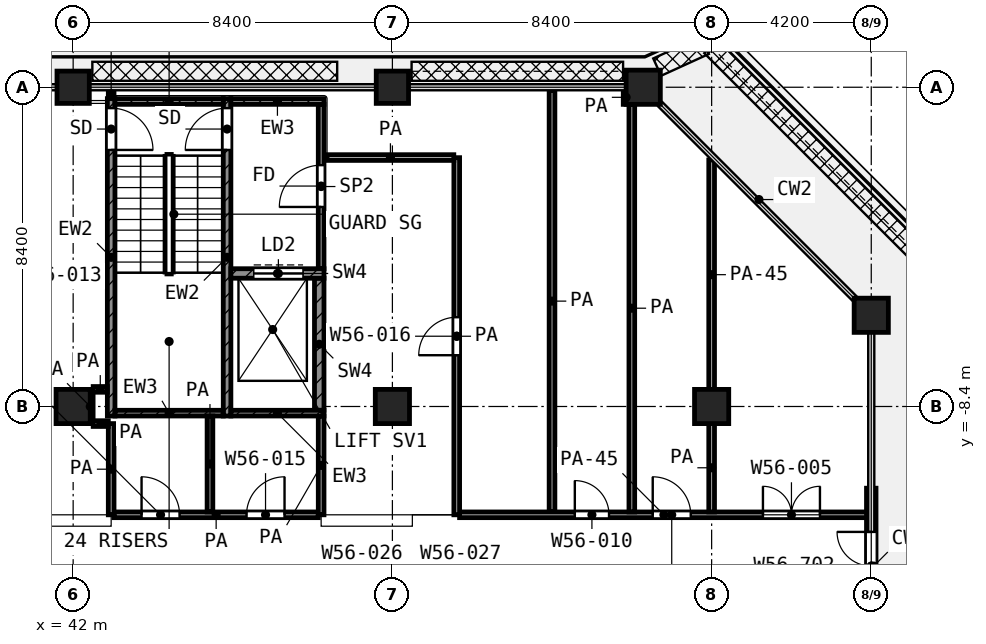
"""IFC4 building model, lengths in metres.
Left out: names, types, materials, properties, quantities, classifications, styles, units other than length and angle.
Written with IfcOpenShell. Run it as: python <this file> out.ifc"""

import sys

from ifc_helpers import new_model, si_unit, direction, frame, frame_2d, origin, origin_2d, place, context, subcontext, project, spatial, rectangle, extrude, element, fill, save


model = new_model("IFC4")
c1 = context("Model", 3, precision=1e-05, world=origin(), true_north=direction((0.0, 1.0)))
c2 = subcontext(c1, "Body", "Model", "MODEL_VIEW")
j1 = project(units=[si_unit("LENGTHUNIT", "METRE"), si_unit("PLANEANGLEUNIT", "RADIAN")], contexts=[c1])
p1 = place(None, origin())
s1 = spatial("IfcSite", under=j1, at=p1, CompositionType="ELEMENT")
p2 = place(p1, origin())
s2 = spatial("IfcBuilding", under=s1, at=p2, CompositionType="ELEMENT")
p3 = place(p2, frame((0.0, 0.0, 243.2)))
s3 = spatial("IfcBuildingStorey", under=s2, at=p3, CompositionType="ELEMENT", Elevation=243.2)
for number, where, z_axis, x_axis in (
    (1, (42.0, 0.0, 0.0), (0.0, 0.0, 1.0), (1.0, 0.0, 0.0)),
    (2, (50.4, 0.0, 0.0), (0.0, 0.0, 1.0), (1.0, 0.0, 0.0)),
):
    element("IfcColumn", number, at=place(p3, frame(where, z_axis=z_axis, x_axis=x_axis)), inside=s3, PredefinedType="COLUMN", context=c2, shape_type="SweptSolid", body=[
        extrude(rectangle(XDim=0.85, YDim=0.85, at=origin_2d()), origin(), (0.0, 0.0, 1.0), 4.2),
    ])
for number, where, z_axis, x_axis in (
    (3, (57.0, 0.0, 0.0), (0.0, 0.0, 1.0), (1.0, 0.0, 0.0)),
    (4, (63.0, -6.0, 0.0), (0.0, 0.0, 1.0), (1.0, 0.0, 0.0)),
    (5, (42.0, -8.4, 0.0), (0.0, 0.0, 1.0), (1.0, 0.0, 0.0)),
    (6, (50.4, -8.4, 0.0), (0.0, 0.0, 1.0), (1.0, 0.0, 0.0)),
    (7, (58.8, -8.4, 0.0), (0.0, 0.0, 1.0), (1.0, 0.0, 0.0)),
):
    element("IfcColumn", number, at=place(p3, frame(where, z_axis=z_axis, x_axis=x_axis)), inside=s3, PredefinedType="COLUMN", context=c2, shape_type="SweptSolid", body=[
        extrude(rectangle(XDim=0.9, YDim=0.9, at=origin_2d()), origin(), (0.0, 0.0, 1.0), 4.2),
    ])
p4 = place(p3, frame((63.0, -14.65, 0.0), z_axis=(0.0, 0.0, 1.0), x_axis=(0.0, 1.0, 0.0)))
e8 = element("IfcWall", 8, at=p4, inside=s3, PredefinedType="SOLIDWALL", context=c2, shape_type="SweptSolid", body=[
    extrude(rectangle(XDim=4.1, YDim=0.25, at=frame_2d((2.05, 0.0))), origin(), (0.0, 0.0, 1.0), 2.58),
])
p5 = place(p4, frame((1.15, 0.0, 0.0)))
e9 = element("IfcOpeningElement", 9, at=p5, cuts=e8, PredefinedType="OPENING", context=c2, shape_type="SweptSolid", body=[
    extrude(rectangle(XDim=1.8, YDim=2.1, at=frame_2d((0.9, 1.05))), frame((0.0, 0.135, 0.0), z_axis=(0.0, -1.0, 0.0), x_axis=(1.0, 0.0, 0.0)), (0.0, 0.0, 1.0), 0.27),
])
p6 = place(p3, frame((43.0, -8.65, 0.0), z_axis=(0.0, 0.0, 1.0), x_axis=(0.0, 1.0, 0.0)))
e10 = element("IfcWall", 10, at=p6, inside=s3, PredefinedType="SHEAR", context=c2, shape_type="SweptSolid", body=[
    extrude(rectangle(XDim=8.35, YDim=0.2, at=frame_2d((4.175, 0.0))), origin(), (0.0, 0.0, 1.0), 3.6),
])
p7 = place(p6, frame((7.0, 0.0, 0.0)))
e11 = element("IfcOpeningElement", 11, at=p7, cuts=e10, PredefinedType="OPENING", context=c2, shape_type="SweptSolid", body=[
    extrude(rectangle(XDim=1.1, YDim=2.1, at=frame_2d((0.55, 1.05))), frame((0.0, 0.11, 0.0), z_axis=(0.0, -1.0, 0.0), x_axis=(1.0, 0.0, 0.0)), (0.0, 0.0, 1.0), 0.22),
])
p8 = place(p3, frame((46.05, -8.65, 0.0), z_axis=(0.0, 0.0, 1.0), x_axis=(0.0, 1.0, 0.0)))
e12 = element("IfcWall", 12, at=p8, inside=s3, PredefinedType="SHEAR", context=c2, shape_type="SweptSolid", body=[
    extrude(rectangle(XDim=8.35, YDim=0.2, at=frame_2d((4.175, 0.0))), origin(), (0.0, 0.0, 1.0), 3.6),
])
p9 = place(p8, frame((7.0, 0.0, 0.0)))
e13 = element("IfcOpeningElement", 13, at=p9, cuts=e12, PredefinedType="OPENING", context=c2, shape_type="SweptSolid", body=[
    extrude(rectangle(XDim=1.1, YDim=2.1, at=frame_2d((0.55, 1.05))), frame((0.0, 0.11, 0.0), z_axis=(0.0, -1.0, 0.0), x_axis=(1.0, 0.0, 0.0)), (0.0, 0.0, 1.0), 0.22),
])
p10 = place(p3, frame((43.1, -0.375, 0.0), z_axis=(0.0, 0.0, 1.0), x_axis=(1.0, 0.0, 0.0)))
e14 = element("IfcWall", 14, at=p10, inside=s3, PredefinedType="SHEAR", context=c2, shape_type="SweptSolid", body=[
    extrude(rectangle(XDim=2.85, YDim=0.15, at=frame_2d((1.425, 0.0))), origin(), (0.0, 0.0, 1.0), 3.6),
])
p11 = place(p3, frame((46.15, -0.375, 0.0), z_axis=(0.0, 0.0, 1.0), x_axis=(1.0, 0.0, 0.0)))
e15 = element("IfcWall", 15, at=p11, inside=s3, PredefinedType="SHEAR", context=c2, shape_type="SweptSolid", body=[
    extrude(rectangle(XDim=2.45, YDim=0.15, at=frame_2d((1.225, 0.0))), origin(), (0.0, 0.0, 1.0), 3.6),
])
p12 = place(p3, frame((43.1, -8.575, 0.0), z_axis=(0.0, 0.0, 1.0), x_axis=(1.0, 0.0, 0.0)))
e16 = element("IfcWall", 16, at=p12, inside=s3, PredefinedType="SHEAR", context=c2, shape_type="SweptSolid", body=[
    extrude(rectangle(XDim=2.85, YDim=0.15, at=frame_2d((1.425, 0.0))), origin(), (0.0, 0.0, 1.0), 3.6),
])
p13 = place(p3, frame((46.15, -8.575, 0.0), z_axis=(0.0, 0.0, 1.0), x_axis=(1.0, 0.0, 0.0)))
e17 = element("IfcWall", 17, at=p13, inside=s3, PredefinedType="SHEAR", context=c2, shape_type="SweptSolid", body=[
    extrude(rectangle(XDim=2.45, YDim=0.15, at=frame_2d((1.225, 0.0))), origin(), (0.0, 0.0, 1.0), 3.6),
])
p14 = place(p3, frame((46.15, -4.9, 0.0), z_axis=(0.0, 0.0, 1.0), x_axis=(1.0, 0.0, 0.0)))
e18 = element("IfcWall", 18, at=p14, inside=s3, PredefinedType="SHEAR", context=c2, shape_type="SweptSolid", body=[
    extrude(rectangle(XDim=2.45, YDim=0.25, at=frame_2d((1.225, 0.0))), origin(), (0.0, 0.0, 1.0), 3.6),
])
p15 = place(p14, frame((0.6, 0.0, 0.0)))
e19 = element("IfcOpeningElement", 19, at=p15, cuts=e18, PredefinedType="OPENING", context=c2, shape_type="SweptSolid", body=[
    extrude(rectangle(XDim=1.3, YDim=2.1, at=frame_2d((0.65, 1.05))), frame((0.0, 0.135, 0.0), z_axis=(0.0, -1.0, 0.0), x_axis=(1.0, 0.0, 0.0)), (0.0, 0.0, 1.0), 0.27),
])
p16 = place(p3, frame((48.475, -8.5, 0.0), z_axis=(0.0, 0.0, 1.0), x_axis=(0.0, 1.0, 0.0)))
e20 = element("IfcWall", 20, at=p16, inside=s3, PredefinedType="SHEAR", context=c2, shape_type="SweptSolid", body=[
    extrude(rectangle(XDim=3.475, YDim=0.25, at=frame_2d((1.738, 0.0))), origin(), (0.0, 0.0, 1.0), 3.6),
])
p17 = place(p3, frame((48.525, -4.775, 0.0), z_axis=(0.0, 0.0, 1.0), x_axis=(0.0, 1.0, 0.0)))
e21 = element("IfcWall", 21, at=p17, inside=s3, PredefinedType="PARTITIONING", context=c2, shape_type="SweptSolid", body=[
    extrude(rectangle(XDim=4.325, YDim=0.15, at=frame_2d((2.163, 0.0))), origin(), (0.0, 0.0, 1.0), 3.6),
])
p18 = place(p17, frame((1.625, 0.0, 0.0)))
e22 = element("IfcOpeningElement", 22, at=p18, cuts=e21, PredefinedType="OPENING", context=c2, shape_type="SweptSolid", body=[
    extrude(rectangle(XDim=1.1, YDim=2.1, at=frame_2d((0.55, 1.05))), frame((0.0, 0.085, 0.0), z_axis=(0.0, -1.0, 0.0), x_axis=(1.0, 0.0, 0.0)), (0.0, 0.0, 1.0), 0.17),
])
p19 = place(p3, frame((43.075, -11.25, 0.0), z_axis=(0.0, 0.0, 1.0), x_axis=(1.0, 0.0, 0.0)))
e23 = element("IfcWall", 23, at=p19, inside=s3, PredefinedType="PARTITIONING", context=c2, shape_type="SweptSolid", body=[
    extrude(rectangle(XDim=5.375, YDim=0.15, at=frame_2d((2.688, 0.0))), origin(), (0.0, 0.0, 1.0), 3.6),
])
p20 = place(p19, frame((0.725, 0.0, 0.0)))
e24 = element("IfcOpeningElement", 24, at=p20, cuts=e23, PredefinedType="OPENING", context=c2, shape_type="SweptSolid", body=[
    extrude(rectangle(XDim=1.0, YDim=2.1, at=frame_2d((0.5, 1.05))), frame((0.0, 0.085, 0.0), z_axis=(0.0, -1.0, 0.0), x_axis=(1.0, 0.0, 0.0)), (0.0, 0.0, 1.0), 0.17),
])
p21 = place(p19, frame((3.487, 0.0, 0.0)))
e25 = element("IfcOpeningElement", 25, at=p21, cuts=e23, PredefinedType="OPENING", context=c2, shape_type="SweptSolid", body=[
    extrude(rectangle(XDim=1.0, YDim=2.1, at=frame_2d((0.5, 1.05))), frame((0.0, 0.085, 0.0), z_axis=(0.0, -1.0, 0.0), x_axis=(1.0, 0.0, 0.0)), (0.0, 0.0, 1.0), 0.17),
])
p22 = place(p3, frame((52.168, -11.25, 0.0), z_axis=(0.0, 0.0, 1.0), x_axis=(1.0, 0.0, 0.0)))
e26 = element("IfcWall", 26, at=p22, inside=s3, PredefinedType="PARTITIONING", context=c2, shape_type="SweptSolid", body=[
    extrude(rectangle(XDim=10.752, YDim=0.15, at=frame_2d((5.376, 0.0))), origin(), (0.0, 0.0, 1.0), 2.7),
])
p23 = place(p22, frame((3.032, 0.0, 0.0)))
e27 = element("IfcOpeningElement", 27, at=p23, cuts=e26, PredefinedType="OPENING", context=c2, shape_type="SweptSolid", body=[
    extrude(rectangle(XDim=0.9, YDim=2.1, at=frame_2d((0.45, 1.05))), frame((0.0, 0.085, 0.0), z_axis=(0.0, -1.0, 0.0), x_axis=(1.0, 0.0, 0.0)), (0.0, 0.0, 1.0), 0.17),
])
p24 = place(p22, frame((5.082, 0.0, 0.0)))
e28 = element("IfcOpeningElement", 28, at=p24, cuts=e26, PredefinedType="OPENING", context=c2, shape_type="SweptSolid", body=[
    extrude(rectangle(XDim=1.0, YDim=2.1, at=frame_2d((0.5, 1.05))), frame((0.0, 0.085, 0.0), z_axis=(0.0, -1.0, 0.0), x_axis=(1.0, 0.0, 0.0)), (0.0, 0.0, 1.0), 0.17),
])
p25 = place(p22, frame((7.982, 0.0, 0.0)))
e29 = element("IfcOpeningElement", 29, at=p25, cuts=e26, PredefinedType="OPENING", context=c2, shape_type="SweptSolid", body=[
    extrude(rectangle(XDim=1.5, YDim=2.1, at=frame_2d((0.75, 1.05))), frame((0.0, 0.085, 0.0), z_axis=(0.0, -1.0, 0.0), x_axis=(1.0, 0.0, 0.0)), (0.0, 0.0, 1.0), 0.17),
])
p26 = place(p3, frame((42.527, -8.85, 0.0), z_axis=(0.0, 0.0, 1.0), x_axis=(1.0, 0.0, 0.0)))
e30 = element("IfcWall", 30, at=p26, inside=s3, PredefinedType="PARTITIONING", context=c2, shape_type="SweptSolid", body=[
    extrude(rectangle(XDim=0.398, YDim=0.15, at=frame_2d((0.199, 0.0))), origin(), (0.0, 0.0, 1.0), 3.6),
])
p27 = place(p3, frame((42.527, -7.95, 0.0), z_axis=(0.0, 0.0, 1.0), x_axis=(1.0, 0.0, 0.0)))
e31 = element("IfcWall", 31, at=p27, inside=s3, PredefinedType="PARTITIONING", context=c2, shape_type="SweptSolid", body=[
    extrude(rectangle(XDim=0.373, YDim=0.15, at=frame_2d((0.187, 0.0))), origin(), (0.0, 0.0, 1.0), 3.6),
])
p28 = place(p3, frame((48.68, -1.85, 0.0), z_axis=(0.0, 0.0, 1.0), x_axis=(1.0, 0.0, 0.0)))
e32 = element("IfcWall", 32, at=p28, inside=s3, PredefinedType="PARTITIONING", context=c2, shape_type="SweptSolid", body=[
    extrude(rectangle(XDim=3.336, YDim=0.15, at=frame_2d((1.668, 0.0))), origin(), (0.0, 0.0, 1.0), 3.6),
])
p29 = place(p3, frame((42.45, -8.849, 0.0), z_axis=(0.0, 0.0, 1.0), x_axis=(0.0, 1.0, 0.0)))
e33 = element("IfcWall", 33, at=p29, inside=s3, PredefinedType="PARTITIONING", context=c2, shape_type="SweptSolid", body=[
    extrude(rectangle(XDim=0.897, YDim=0.15, at=frame_2d((0.449, 0.0))), origin(), (0.0, 0.0, 1.0), 3.6),
])
p30 = place(p3, frame((43.0, -11.25, 0.0), z_axis=(0.0, 0.0, 1.0), x_axis=(0.0, 1.0, 0.0)))
e34 = element("IfcWall", 34, at=p30, inside=s3, PredefinedType="PARTITIONING", context=c2, shape_type="SweptSolid", body=[
    extrude(rectangle(XDim=2.4, YDim=0.15, at=frame_2d((1.2, 0.0))), origin(), (0.0, 0.0, 1.0), 3.6),
])
p31 = place(p3, frame((43.0, -0.27, 0.0), z_axis=(0.0, 0.0, 1.0), x_axis=(0.0, 1.0, 0.0)))
e35 = element("IfcWall", 35, at=p31, inside=s3, PredefinedType="PARTITIONING", context=c2, shape_type="SweptSolid", body=[
    extrude(rectangle(XDim=0.19, YDim=0.15, at=frame_2d((0.095, 0.0))), origin(), (0.0, 0.0, 1.0), 3.6),
])
p32 = place(p3, frame((45.6, -11.175, 0.0), z_axis=(0.0, 0.0, 1.0), x_axis=(0.0, 1.0, 0.0)))
e36 = element("IfcWall", 36, at=p32, inside=s3, PredefinedType="PARTITIONING", context=c2, shape_type="SweptSolid", body=[
    extrude(rectangle(XDim=2.525, YDim=0.15, at=frame_2d((1.263, 0.0))), origin(), (0.0, 0.0, 1.0), 3.6),
])
p33 = place(p3, frame((48.525, -11.25, 0.0), z_axis=(0.0, 0.0, 1.0), x_axis=(0.0, 1.0, 0.0)))
e37 = element("IfcWall", 37, at=p33, inside=s3, PredefinedType="PARTITIONING", context=c2, shape_type="SweptSolid", body=[
    extrude(rectangle(XDim=2.6, YDim=0.15, at=frame_2d((1.3, 0.0))), origin(), (0.0, 0.0, 1.0), 3.6),
])
p34 = place(p3, frame((52.093, -11.25, 0.0), z_axis=(0.0, 0.0, 1.0), x_axis=(0.0, 1.0, 0.0)))
e38 = element("IfcWall", 38, at=p34, inside=s3, PredefinedType="PARTITIONING", context=c2, shape_type="SweptSolid", body=[
    extrude(rectangle(XDim=9.397, YDim=0.15, at=frame_2d((4.698, 0.0))), origin(), (0.0, 0.0, 1.0), 3.6),
])
p35 = place(p34, frame((4.199, 0.0, 0.0)))
e39 = element("IfcOpeningElement", 39, at=p35, cuts=e38, PredefinedType="OPENING", context=c2, shape_type="SweptSolid", body=[
    extrude(rectangle(XDim=1.0, YDim=2.1, at=frame_2d((0.5, 1.05))), frame((0.0, 0.085, 0.0), z_axis=(0.0, -1.0, 0.0), x_axis=(1.0, 0.0, 0.0)), (0.0, 0.0, 1.0), 0.17),
])
p36 = place(p3, frame((54.6, -11.175, 0.0), z_axis=(0.0, 0.0, 1.0), x_axis=(0.0, 1.0, 0.0)))
e40 = element("IfcWall", 40, at=p36, inside=s3, PredefinedType="PARTITIONING", context=c2, shape_type="SweptSolid", body=[
    extrude(rectangle(XDim=11.095, YDim=0.15, at=frame_2d((5.547, 0.0))), origin(), (0.0, 0.0, 1.0), 3.6),
])
p37 = place(p3, frame((56.55, -0.45, 0.0), z_axis=(0.0, 0.0, 1.0), x_axis=(0.0, 1.0, 0.0)))
e41 = element("IfcWall", 41, at=p37, inside=s3, PredefinedType="PARTITIONING", context=c2, shape_type="SweptSolid", body=[
    extrude(rectangle(XDim=0.37, YDim=0.15, at=frame_2d((0.185, 0.0))), origin(), (0.0, 0.0, 1.0), 3.6),
])
p38 = place(p3, frame((56.7, -11.175, 0.0), z_axis=(0.0, 0.0, 1.0), x_axis=(0.0, 1.0, 0.0)))
e42 = element("IfcWall", 42, at=p38, inside=s3, PredefinedType="PARTITIONING", context=c2, shape_type="SweptSolid", body=[
    extrude(rectangle(XDim=10.722, YDim=0.15, at=frame_2d((5.361, 0.0))), origin(), (0.0, 0.0, 1.0), 3.6),
])
p39 = place(p3, frame((58.8, -11.175, 0.0), z_axis=(0.0, 0.0, 1.0), x_axis=(0.0, 1.0, 0.0)))
e43 = element("IfcWall", 43, at=p39, inside=s3, PredefinedType="PARTITIONING", context=c2, shape_type="SweptSolid", body=[
    extrude(rectangle(XDim=2.325, YDim=0.15, at=frame_2d((1.163, 0.0))), origin(), (0.0, 0.0, 1.0), 3.6),
])
p40 = place(p3, frame((58.8, -7.95, 0.0), z_axis=(0.0, 0.0, 1.0), x_axis=(0.0, 1.0, 0.0)))
e44 = element("IfcWall", 44, at=p40, inside=s3, PredefinedType="PARTITIONING", context=c2, shape_type="SweptSolid", body=[
    extrude(rectangle(XDim=6.037, YDim=0.15, at=frame_2d((3.019, 0.0))), origin(), (0.0, 0.0, 1.0), 2.7),
])
p41 = place(p5, origin())
e45 = element("IfcDoor", 45, at=p41, inside=s3, OperationType="DOUBLE_DOOR_SINGLE_SWING", PredefinedType="DOOR", context=c2, shape_type="SweptSolid", body=[
    extrude(rectangle(XDim=1.8, YDim=2.1, at=frame_2d((0.9, 1.05))), frame((0.0, 0.025, 0.0), z_axis=(0.0, -1.0, 0.0), x_axis=(1.0, 0.0, 0.0)), (0.0, 0.0, 1.0), 0.05),
])
fill(e9, e45)
p42 = place(p7, frame((1.1, 0.0, 0.0), z_axis=(0.0, 0.0, 1.0), x_axis=(-1.0, 0.0, 0.0)))
e46 = element("IfcDoor", 46, at=p42, inside=s3, OperationType="SINGLE_SWING_LEFT", PredefinedType="DOOR", context=c2, shape_type="SweptSolid", body=[
    extrude(rectangle(XDim=1.1, YDim=2.1, at=frame_2d((0.55, 1.05))), frame((0.0, 0.025, 0.0), z_axis=(0.0, -1.0, 0.0), x_axis=(1.0, 0.0, 0.0)), (0.0, 0.0, 1.0), 0.05),
])
fill(e11, e46)
p43 = place(p9, origin())
e47 = element("IfcDoor", 47, at=p43, inside=s3, OperationType="SINGLE_SWING_LEFT", PredefinedType="DOOR", context=c2, shape_type="SweptSolid", body=[
    extrude(rectangle(XDim=1.1, YDim=2.1, at=frame_2d((0.55, 1.05))), frame((0.0, 0.025, 0.0), z_axis=(0.0, -1.0, 0.0), x_axis=(1.0, 0.0, 0.0)), (0.0, 0.0, 1.0), 0.05),
])
fill(e13, e47)
p44 = place(p15, origin())
e48 = element("IfcDoor", 48, at=p44, inside=s3, OperationType="DOUBLE_DOOR_SLIDING", PredefinedType="DOOR", context=c2, shape_type="SweptSolid", body=[
    extrude(rectangle(XDim=1.3, YDim=2.1, at=frame_2d((0.65, 1.05))), frame((0.0, 0.025, 0.0), z_axis=(0.0, -1.0, 0.0), x_axis=(1.0, 0.0, 0.0)), (0.0, 0.0, 1.0), 0.05),
])
fill(e19, e48)
p45 = place(p18, origin())
e49 = element("IfcDoor", 49, at=p45, inside=s3, OperationType="SINGLE_SWING_LEFT", PredefinedType="DOOR", context=c2, shape_type="SweptSolid", body=[
    extrude(rectangle(XDim=1.1, YDim=2.1, at=frame_2d((0.55, 1.05))), frame((0.0, 0.025, 0.0), z_axis=(0.0, -1.0, 0.0), x_axis=(1.0, 0.0, 0.0)), (0.0, 0.0, 1.0), 0.05),
])
fill(e22, e49)
p46 = place(p20, origin())
e50 = element("IfcDoor", 50, at=p46, inside=s3, OperationType="SINGLE_SWING_LEFT", PredefinedType="DOOR", context=c2, shape_type="SweptSolid", body=[
    extrude(rectangle(XDim=1.0, YDim=2.1, at=frame_2d((0.5, 1.05))), frame((0.0, 0.025, 0.0), z_axis=(0.0, -1.0, 0.0), x_axis=(1.0, 0.0, 0.0)), (0.0, 0.0, 1.0), 0.05),
])
fill(e24, e50)
p47 = place(p21, origin())
e51 = element("IfcDoor", 51, at=p47, inside=s3, OperationType="SINGLE_SWING_RIGHT", PredefinedType="DOOR", context=c2, shape_type="SweptSolid", body=[
    extrude(rectangle(XDim=1.0, YDim=2.1, at=frame_2d((0.5, 1.05))), frame((0.0, 0.025, 0.0), z_axis=(0.0, -1.0, 0.0), x_axis=(1.0, 0.0, 0.0)), (0.0, 0.0, 1.0), 0.05),
])
fill(e25, e51)
p48 = place(p35, origin())
e52 = element("IfcDoor", 52, at=p48, inside=s3, OperationType="SINGLE_SWING_LEFT", PredefinedType="DOOR", context=c2, shape_type="SweptSolid", body=[
    extrude(rectangle(XDim=1.0, YDim=2.1, at=frame_2d((0.5, 1.05))), frame((0.0, 0.025, 0.0), z_axis=(0.0, -1.0, 0.0), x_axis=(1.0, 0.0, 0.0)), (0.0, 0.0, 1.0), 0.05),
])
fill(e39, e52)
p49 = place(p23, origin())
e53 = element("IfcDoor", 53, at=p49, inside=s3, OperationType="SINGLE_SWING_LEFT", PredefinedType="DOOR", context=c2, shape_type="SweptSolid", body=[
    extrude(rectangle(XDim=0.9, YDim=2.1, at=frame_2d((0.45, 1.05))), frame((0.0, 0.025, 0.0), z_axis=(0.0, -1.0, 0.0), x_axis=(1.0, 0.0, 0.0)), (0.0, 0.0, 1.0), 0.05),
])
fill(e27, e53)
p50 = place(p24, origin())
e54 = element("IfcDoor", 54, at=p50, inside=s3, OperationType="SINGLE_SWING_LEFT", PredefinedType="DOOR", context=c2, shape_type="SweptSolid", body=[
    extrude(rectangle(XDim=1.0, YDim=2.1, at=frame_2d((0.5, 1.05))), frame((0.0, 0.025, 0.0), z_axis=(0.0, -1.0, 0.0), x_axis=(1.0, 0.0, 0.0)), (0.0, 0.0, 1.0), 0.05),
])
fill(e28, e54)
p51 = place(p25, origin())
e55 = element("IfcDoor", 55, at=p51, inside=s3, OperationType="DOUBLE_DOOR_SINGLE_SWING", PredefinedType="DOOR", context=c2, shape_type="SweptSolid", body=[
    extrude(rectangle(XDim=1.5, YDim=2.1, at=frame_2d((0.75, 1.05))), frame((0.0, 0.025, 0.0), z_axis=(0.0, -1.0, 0.0), x_axis=(1.0, 0.0, 0.0)), (0.0, 0.0, 1.0), 0.05),
])
fill(e29, e55)
save(model, sys.argv[1])
